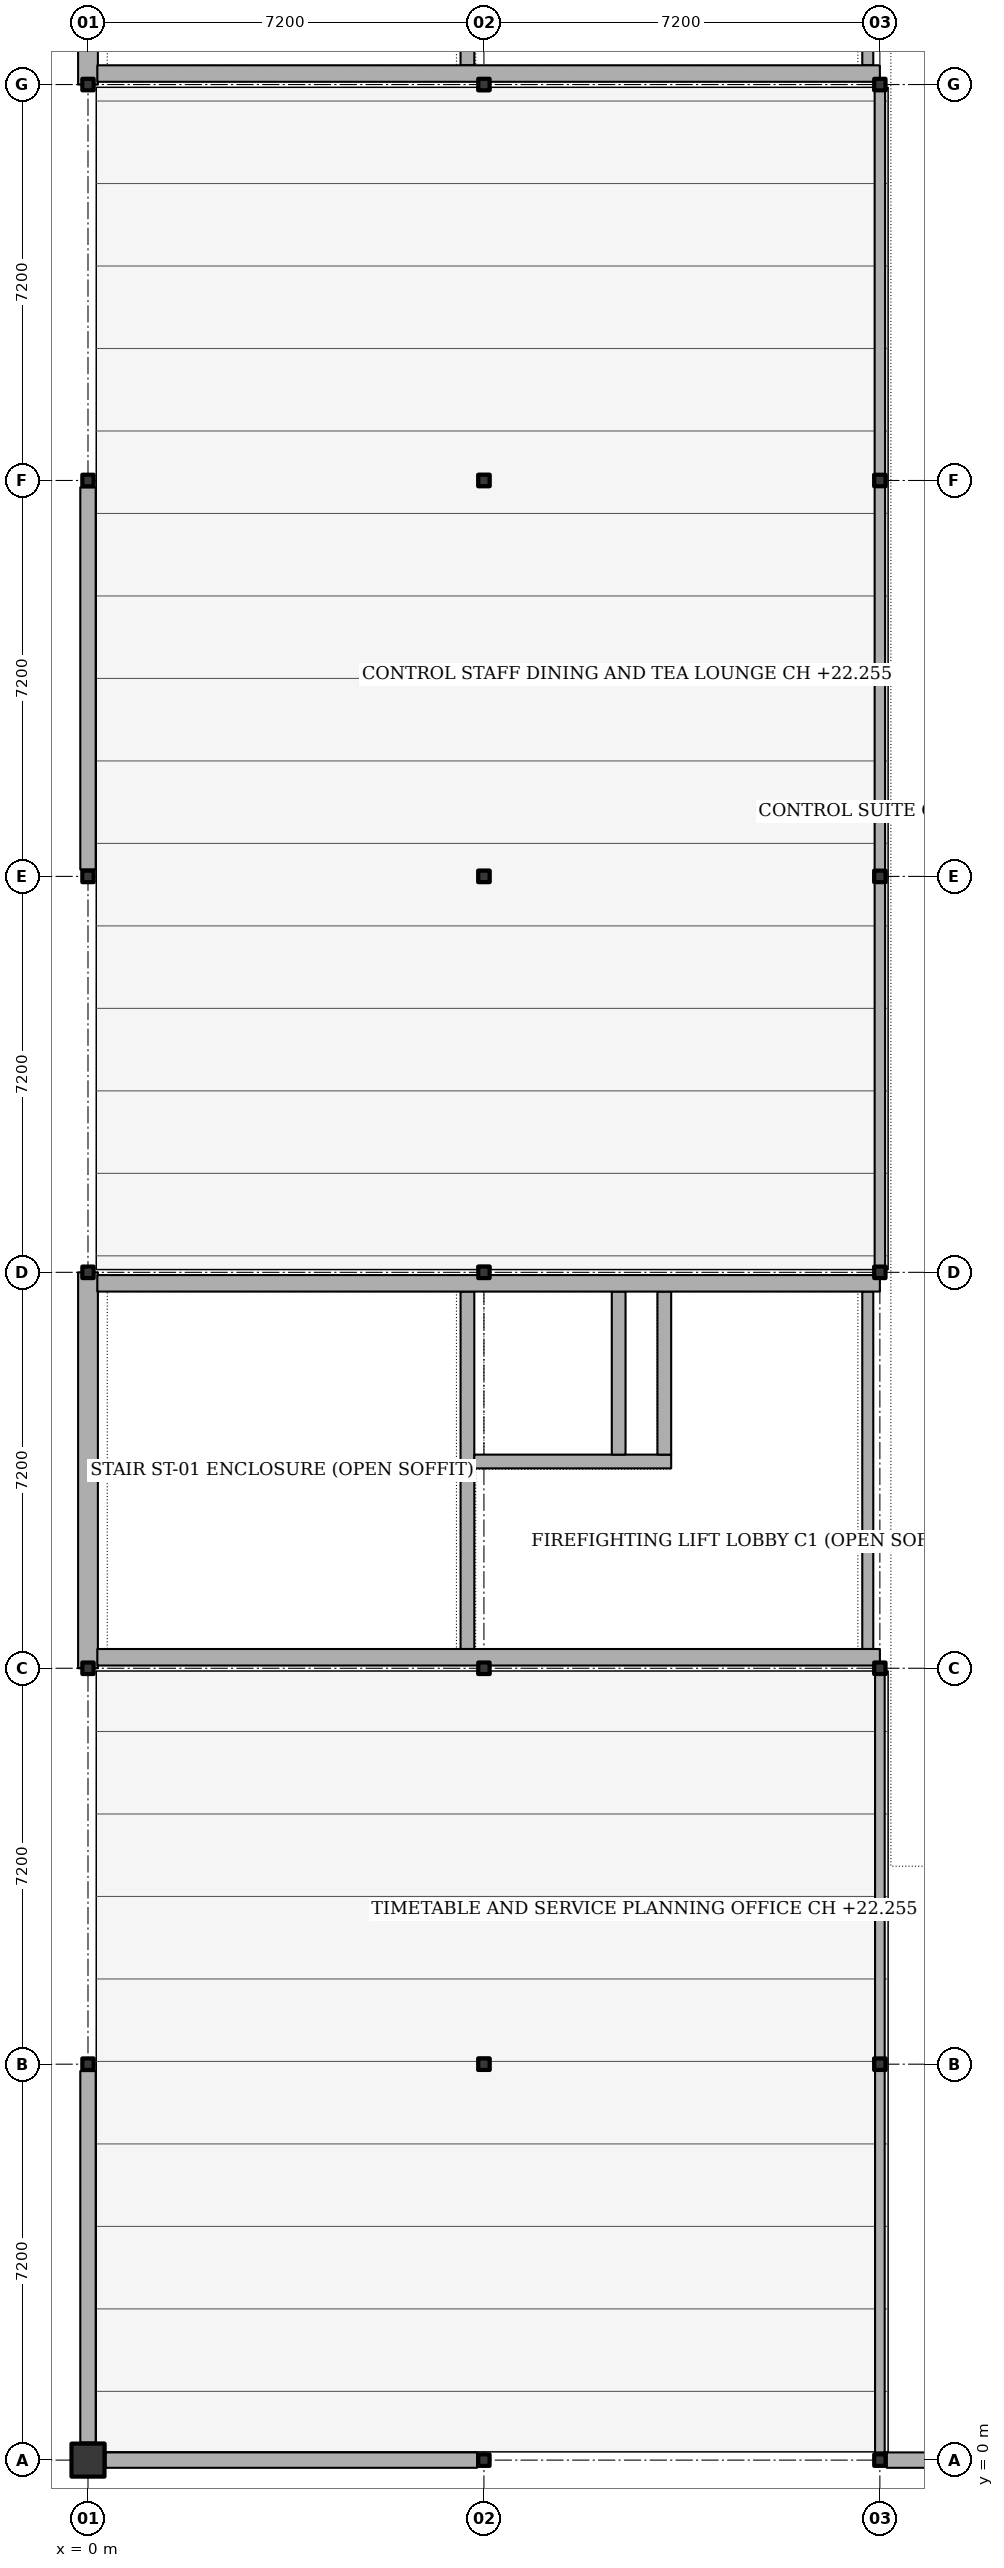
"""IFC4 building model, lengths in metres.
Left out: names, types, materials, properties, quantities, classifications, styles, units other than length and angle.
Written with IfcOpenShell. Run it as: python <this file> out.ifc"""

import sys

from ifc_helpers import new_model, si_unit, direction, frame, frame_2d, origin, origin_with_axes, origin_2d, place, context, subcontext, project, spatial, rectangle, i_section, extrude, element, fill, save


model = new_model("IFC4")
c1 = context("Model", 3, precision=1e-05, world=origin(), true_north=direction((0.0, 1.0)))
c2 = subcontext(c1, "Body", "Model", "MODEL_VIEW")
j1 = project(units=[si_unit("LENGTHUNIT", "METRE"), si_unit("PLANEANGLEUNIT", "RADIAN")], contexts=[c1])
p1 = place(None, origin())
s1 = spatial("IfcSite", under=j1, at=p1, CompositionType="ELEMENT")
p2 = place(p1, origin())
s2 = spatial("IfcBuilding", under=s1, at=p2, CompositionType="ELEMENT")
p3 = place(p2, frame((0.0, 0.0, 18.9)))
s3 = spatial("IfcBuildingStorey", under=s2, at=p3, CompositionType="ELEMENT", Elevation=18.9)
p4 = place(p3, origin_with_axes())
e1 = element("IfcColumn", 1, at=p4, inside=s3, PredefinedType="COLUMN", context=c2, shape_type="SweptSolid", body=[
    extrude(rectangle(XDim=0.6, YDim=0.6, at=origin_2d()), origin(), (0.0, 0.0, 1.0), 4.5),
])
for number, where, z_axis, x_axis in (
    (2, (0.0, 7.2, 0.0), (0.0, 0.0, 1.0), (1.0, 0.0, 0.0)),
    (3, (0.0, 14.4, 0.0), (0.0, 0.0, 1.0), (1.0, 0.0, 0.0)),
    (4, (0.0, 21.6, 0.0), (0.0, 0.0, 1.0), (1.0, 0.0, 0.0)),
    (5, (0.0, 28.8, 0.0), (0.0, 0.0, 1.0), (1.0, 0.0, 0.0)),
    (6, (0.0, 36.0, 0.0), (0.0, 0.0, 1.0), (1.0, 0.0, 0.0)),
    (7, (0.0, 43.2, 0.0), (0.0, 0.0, 1.0), (1.0, 0.0, 0.0)),
    (8, (7.2, 0.0, 0.0), (0.0, 0.0, 1.0), (1.0, 0.0, 0.0)),
    (9, (7.2, 7.2, 0.0), (0.0, 0.0, 1.0), (1.0, 0.0, 0.0)),
    (10, (7.2, 14.4, 0.0), (0.0, 0.0, 1.0), (1.0, 0.0, 0.0)),
    (11, (7.2, 21.6, 0.0), (0.0, 0.0, 1.0), (1.0, 0.0, 0.0)),
    (12, (7.2, 28.8, 0.0), (0.0, 0.0, 1.0), (1.0, 0.0, 0.0)),
    (13, (7.2, 36.0, 0.0), (0.0, 0.0, 1.0), (1.0, 0.0, 0.0)),
    (14, (7.2, 43.2, 0.0), (0.0, 0.0, 1.0), (1.0, 0.0, 0.0)),
    (15, (14.4, 0.0, 0.0), (0.0, 0.0, 1.0), (1.0, 0.0, 0.0)),
    (16, (14.4, 7.2, 0.0), (0.0, 0.0, 1.0), (1.0, 0.0, 0.0)),
    (17, (14.4, 14.4, 0.0), (0.0, 0.0, 1.0), (1.0, 0.0, 0.0)),
    (18, (14.4, 21.6, 0.0), (0.0, 0.0, 1.0), (1.0, 0.0, 0.0)),
    (19, (14.4, 28.8, 0.0), (0.0, 0.0, 1.0), (1.0, 0.0, 0.0)),
    (20, (14.4, 36.0, 0.0), (0.0, 0.0, 1.0), (1.0, 0.0, 0.0)),
    (21, (14.4, 43.2, 0.0), (0.0, 0.0, 1.0), (1.0, 0.0, 0.0)),
):
    element("IfcColumn", number, at=place(p3, frame(where, z_axis=z_axis, x_axis=x_axis)), inside=s3, PredefinedType="COLUMN", context=c2, shape_type="SweptSolid", body=[
        extrude(i_section(OverallWidth=0.206, OverallDepth=0.21, WebThickness=0.01, FlangeThickness=0.014, FilletRadius=0.01, at=origin_2d()), origin(), (0.0, 0.0, 1.0), 4.5),
    ])
p5 = place(p3, frame((0.0, 0.32, 0.0), z_axis=(0.0, 0.0, 1.0), x_axis=(0.0, 1.0, 0.0)))
e22 = element("IfcWall", 22, at=p5, inside=s3, PredefinedType="SOLIDWALL", context=c2, shape_type="SweptSolid", body=[
    extrude(rectangle(XDim=6.755, YDim=0.28, at=frame_2d((3.377, 0.0))), origin(), (0.0, 0.0, 1.0), 3.85),
])
p6 = place(p3, frame((0.0, 14.4, 0.0), z_axis=(0.0, 0.0, 1.0), x_axis=(0.0, 1.0, 0.0)))
e23 = element("IfcWall", 23, at=p6, inside=s3, PredefinedType="SHEAR", context=c2, shape_type="SweptSolid", body=[
    extrude(rectangle(XDim=7.2, YDim=0.36, at=frame_2d((3.6, 0.0))), origin(), (0.0, 0.0, 1.0), 3.85),
])
p7 = place(p3, frame((0.0, 28.925, 0.0), z_axis=(0.0, 0.0, 1.0), x_axis=(0.0, 1.0, 0.0)))
e24 = element("IfcWall", 24, at=p7, inside=s3, PredefinedType="SOLIDWALL", context=c2, shape_type="SweptSolid", body=[
    extrude(rectangle(XDim=6.95, YDim=0.28, at=frame_2d((3.475, 0.0))), origin(), (0.0, 0.0, 1.0), 3.85),
])
p8 = place(p7, frame((2.575, 0.0, 1.05)))
e25 = element("IfcOpeningElement", 25, at=p8, cuts=e24, PredefinedType="OPENING", context=c2, shape_type="SweptSolid", body=[
    extrude(rectangle(XDim=1.8, YDim=1.8, at=frame_2d((0.9, 0.9))), frame((0.0, 0.15, 0.0), z_axis=(0.0, -1.0, 0.0), x_axis=(1.0, 0.0, 0.0)), (0.0, 0.0, 1.0), 0.3),
])
p9 = place(p3, frame((0.0, 43.2, 0.0), z_axis=(0.0, 0.0, 1.0), x_axis=(0.0, 1.0, 0.0)))
e26 = element("IfcWall", 26, at=p9, inside=s3, PredefinedType="SHEAR", context=c2, shape_type="SweptSolid", body=[
    extrude(rectangle(XDim=7.2, YDim=0.36, at=frame_2d((3.6, 0.0))), origin(), (0.0, 0.0, 1.0), 3.85),
])
p10 = place(p3, frame((21.475, 0.0, 0.0), z_axis=(0.0, 0.0, 1.0), x_axis=(-1.0, 0.0, 0.0)))
e27 = element("IfcWall", 27, at=p10, inside=s3, PredefinedType="SOLIDWALL", context=c2, shape_type="SweptSolid", body=[
    extrude(rectangle(XDim=6.95, YDim=0.28, at=frame_2d((3.475, 0.0))), origin(), (0.0, 0.0, 1.0), 3.658),
])
p11 = place(p10, frame((3.803, 0.0, 1.05)))
e28 = element("IfcOpeningElement", 28, at=p11, cuts=e27, PredefinedType="OPENING", context=c2, shape_type="SweptSolid", body=[
    extrude(rectangle(XDim=2.47, YDim=1.5, at=frame_2d((1.235, 0.75))), frame((0.0, 0.15, 0.0), z_axis=(0.0, -1.0, 0.0), x_axis=(1.0, 0.0, 0.0)), (0.0, 0.0, 1.0), 0.3),
])
p12 = place(p3, frame((7.075, 0.0, 0.0), z_axis=(0.0, 0.0, 1.0), x_axis=(-1.0, 0.0, 0.0)))
e29 = element("IfcWall", 29, at=p12, inside=s3, PredefinedType="SOLIDWALL", context=c2, shape_type="SweptSolid", body=[
    extrude(rectangle(XDim=6.755, YDim=0.28, at=frame_2d((3.377, 0.0))), origin(), (0.0, 0.0, 1.0), 3.658),
])
p13 = place(p12, frame((2.478, 0.0, 1.05)))
e30 = element("IfcOpeningElement", 30, at=p13, cuts=e29, PredefinedType="OPENING", context=c2, shape_type="SweptSolid", body=[
    extrude(rectangle(XDim=1.8, YDim=1.8, at=frame_2d((0.9, 0.9))), frame((0.0, 0.15, 0.0), z_axis=(0.0, -1.0, 0.0), x_axis=(1.0, 0.0, 0.0)), (0.0, 0.0, 1.0), 0.3),
])
p14 = place(p3, frame((6.9, 14.75, 0.0), z_axis=(0.0, 0.0, 1.0), x_axis=(0.0, 1.0, 0.0)))
e31 = element("IfcWall", 31, at=p14, inside=s3, PredefinedType="SHEAR", context=c2, shape_type="SweptSolid", body=[
    extrude(rectangle(XDim=6.5, YDim=0.25, at=frame_2d((3.25, 0.0))), origin(), (0.0, 0.0, 1.0), 3.65),
])
p15 = place(p14, frame((0.95, 0.0, 0.0)))
e32 = element("IfcOpeningElement", 32, at=p15, cuts=e31, PredefinedType="OPENING", context=c2, shape_type="SweptSolid", body=[
    extrude(rectangle(XDim=1.35, YDim=2.15, at=frame_2d((0.675, 1.075))), frame((0.0, 0.135, 0.0), z_axis=(0.0, -1.0, 0.0), x_axis=(1.0, 0.0, 0.0)), (0.0, 0.0, 1.0), 0.27),
])
p16 = place(p3, frame((7.025, 18.16, 0.0), z_axis=(0.0, 0.0, 1.0), x_axis=(1.0, 0.0, 0.0)))
e33 = element("IfcWall", 33, at=p16, inside=s3, PredefinedType="SHEAR", context=c2, shape_type="SweptSolid", body=[
    extrude(rectangle(XDim=3.58, YDim=0.25, at=frame_2d((1.79, 0.0))), origin(), (0.0, 0.0, 1.0), 3.65),
])
p17 = place(p16, frame((0.775, 0.0, 0.0)))
e34 = element("IfcOpeningElement", 34, at=p17, cuts=e33, PredefinedType="OPENING", context=c2, shape_type="SweptSolid", body=[
    extrude(rectangle(XDim=1.1, YDim=2.15, at=frame_2d((0.55, 1.075))), frame((0.0, 0.135, 0.0), z_axis=(0.0, -1.0, 0.0), x_axis=(1.0, 0.0, 0.0)), (0.0, 0.0, 1.0), 0.27),
])
p18 = place(p3, frame((9.65, 18.285, 0.0), z_axis=(0.0, 0.0, 1.0), x_axis=(0.0, 1.0, 0.0)))
e35 = element("IfcWall", 35, at=p18, inside=s3, PredefinedType="SHEAR", context=c2, shape_type="SweptSolid", body=[
    extrude(rectangle(XDim=2.965, YDim=0.25, at=frame_2d((1.482, 0.0))), origin(), (0.0, 0.0, 1.0), 3.65),
])
p19 = place(p3, frame((10.48, 18.285, 0.0), z_axis=(0.0, 0.0, 1.0), x_axis=(0.0, 1.0, 0.0)))
e36 = element("IfcWall", 36, at=p19, inside=s3, PredefinedType="SHEAR", context=c2, shape_type="SweptSolid", body=[
    extrude(rectangle(XDim=2.965, YDim=0.25, at=frame_2d((1.482, 0.0))), origin(), (0.0, 0.0, 1.0), 3.65),
])
p20 = place(p19, frame((0.9, 0.0, 0.0)))
e37 = element("IfcOpeningElement", 37, at=p20, cuts=e36, PredefinedType="OPENING", context=c2, shape_type="SweptSolid", body=[
    extrude(rectangle(XDim=0.92, YDim=2.05, at=frame_2d((0.46, 1.025))), frame((0.0, 0.135, 0.0), z_axis=(0.0, -1.0, 0.0), x_axis=(1.0, 0.0, 0.0)), (0.0, 0.0, 1.0), 0.27),
])
p21 = place(p3, frame((14.18, 14.75, 0.0), z_axis=(0.0, 0.0, 1.0), x_axis=(0.0, 1.0, 0.0)))
e38 = element("IfcWall", 38, at=p21, inside=s3, PredefinedType="SOLIDWALL", context=c2, shape_type="SweptSolid", body=[
    extrude(rectangle(XDim=6.5, YDim=0.2, at=frame_2d((3.25, 0.0))), origin(), (0.0, 0.0, 1.0), 3.65),
])
p22 = place(p21, frame((2.5, 0.0, 0.0)))
e39 = element("IfcOpeningElement", 39, at=p22, cuts=e38, PredefinedType="OPENING", context=c2, shape_type="SweptSolid", body=[
    extrude(rectangle(XDim=1.5, YDim=2.15, at=frame_2d((0.75, 1.075))), frame((0.0, 0.11, 0.0), z_axis=(0.0, -1.0, 0.0), x_axis=(1.0, 0.0, 0.0)), (0.0, 0.0, 1.0), 0.22),
])
for number, where, z_axis, x_axis in (
    (40, (0.17, 14.6, 0.0), (0.0, 0.0, 1.0), (1.0, 0.0, 0.0)),
    (41, (0.17, 21.4, 0.0), (0.0, 0.0, 1.0), (1.0, 0.0, 0.0)),
):
    element("IfcWall", number, at=place(p3, frame(where, z_axis=z_axis, x_axis=x_axis)), inside=s3, PredefinedType="SHEAR", context=c2, shape_type="SweptSolid", body=[
        extrude(rectangle(XDim=14.23, YDim=0.3, at=frame_2d((7.115, 0.0))), origin(), (0.0, 0.0, 1.0), 3.65),
    ])
p23 = place(p3, frame((6.9, 43.55, 0.0), z_axis=(0.0, 0.0, 1.0), x_axis=(0.0, 1.0, 0.0)))
e42 = element("IfcWall", 42, at=p23, inside=s3, PredefinedType="SHEAR", context=c2, shape_type="SweptSolid", body=[
    extrude(rectangle(XDim=6.5, YDim=0.25, at=frame_2d((3.25, 0.0))), origin(), (0.0, 0.0, 1.0), 3.65),
])
p24 = place(p23, frame((0.95, 0.0, 0.0)))
e43 = element("IfcOpeningElement", 43, at=p24, cuts=e42, PredefinedType="OPENING", context=c2, shape_type="SweptSolid", body=[
    extrude(rectangle(XDim=1.35, YDim=2.15, at=frame_2d((0.675, 1.075))), frame((0.0, 0.135, 0.0), z_axis=(0.0, -1.0, 0.0), x_axis=(1.0, 0.0, 0.0)), (0.0, 0.0, 1.0), 0.27),
])
p25 = place(p3, frame((14.18, 43.55, 0.0), z_axis=(0.0, 0.0, 1.0), x_axis=(0.0, 1.0, 0.0)))
e44 = element("IfcWall", 44, at=p25, inside=s3, PredefinedType="SOLIDWALL", context=c2, shape_type="SweptSolid", body=[
    extrude(rectangle(XDim=6.5, YDim=0.2, at=frame_2d((3.25, 0.0))), origin(), (0.0, 0.0, 1.0), 3.65),
])
p26 = place(p25, frame((2.5, 0.0, 0.0)))
e45 = element("IfcOpeningElement", 45, at=p26, cuts=e44, PredefinedType="OPENING", context=c2, shape_type="SweptSolid", body=[
    extrude(rectangle(XDim=1.5, YDim=2.15, at=frame_2d((0.75, 1.075))), frame((0.0, 0.11, 0.0), z_axis=(0.0, -1.0, 0.0), x_axis=(1.0, 0.0, 0.0)), (0.0, 0.0, 1.0), 0.22),
])
p27 = place(p3, frame((0.17, 43.4, 0.0), z_axis=(0.0, 0.0, 1.0), x_axis=(1.0, 0.0, 0.0)))
e46 = element("IfcWall", 46, at=p27, inside=s3, PredefinedType="SHEAR", context=c2, shape_type="SweptSolid", body=[
    extrude(rectangle(XDim=14.23, YDim=0.3, at=frame_2d((7.115, 0.0))), origin(), (0.0, 0.0, 1.0), 3.65),
])
p28 = place(p3, frame((14.4, 0.14, 0.0), z_axis=(0.0, 0.0, 1.0), x_axis=(0.0, 1.0, 0.0)))
e47 = element("IfcWall", 47, at=p28, inside=s3, PredefinedType="PARTITIONING", context=c2, shape_type="SweptSolid", body=[
    extrude(rectangle(XDim=6.953, YDim=0.175, at=frame_2d((3.477, 0.0))), origin(), (0.0, 0.0, 1.0), 3.55),
])
p29 = place(p3, frame((14.4, 7.307, 0.0), z_axis=(0.0, 0.0, 1.0), x_axis=(0.0, 1.0, 0.0)))
e48 = element("IfcWall", 48, at=p29, inside=s3, PredefinedType="PARTITIONING", context=c2, shape_type="SweptSolid", body=[
    extrude(rectangle(XDim=6.986, YDim=0.175, at=frame_2d((3.493, 0.0))), origin(), (0.0, 0.0, 1.0), 3.55),
])
p30 = place(p29, frame((3.613, 0.0, 0.0)))
e49 = element("IfcOpeningElement", 49, at=p30, cuts=e48, PredefinedType="OPENING", context=c2, shape_type="SweptSolid", body=[
    extrude(rectangle(XDim=1.18, YDim=2.18, at=frame_2d((0.59, 1.09))), frame((0.0, 0.097, 0.0), z_axis=(0.0, -1.0, 0.0), x_axis=(1.0, 0.0, 0.0)), (0.0, 0.0, 1.0), 0.195),
])
p31 = place(p3, frame((14.4, 21.707, 0.0), z_axis=(0.0, 0.0, 1.0), x_axis=(0.0, 1.0, 0.0)))
e50 = element("IfcWall", 50, at=p31, inside=s3, PredefinedType="PARTITIONING", context=c2, shape_type="SweptSolid", body=[
    extrude(rectangle(XDim=6.986, YDim=0.19, at=frame_2d((3.493, 0.0))), origin(), (0.0, 0.0, 1.0), 3.55),
])
p32 = place(p3, frame((14.4, 28.907, 0.0), z_axis=(0.0, 0.0, 1.0), x_axis=(0.0, 1.0, 0.0)))
e51 = element("IfcWall", 51, at=p32, inside=s3, PredefinedType="PARTITIONING", context=c2, shape_type="SweptSolid", body=[
    extrude(rectangle(XDim=6.986, YDim=0.19, at=frame_2d((3.493, 0.0))), origin(), (0.0, 0.0, 1.0), 3.55),
])
p33 = place(p32, frame((2.693, 0.0, 0.0)))
e52 = element("IfcOpeningElement", 52, at=p33, cuts=e51, PredefinedType="OPENING", context=c2, shape_type="SweptSolid", body=[
    extrude(rectangle(XDim=1.6, YDim=2.2, at=frame_2d((0.8, 1.1))), frame((0.0, 0.105, 0.0), z_axis=(0.0, -1.0, 0.0), x_axis=(1.0, 0.0, 0.0)), (0.0, 0.0, 1.0), 0.21),
])
p34 = place(p3, frame((14.4, 36.107, 0.0), z_axis=(0.0, 0.0, 1.0), x_axis=(0.0, 1.0, 0.0)))
e53 = element("IfcWall", 53, at=p34, inside=s3, PredefinedType="PARTITIONING", context=c2, shape_type="SweptSolid", body=[
    extrude(rectangle(XDim=6.986, YDim=0.19, at=frame_2d((3.493, 0.0))), origin(), (0.0, 0.0, 1.0), 3.55),
])
p35 = place(p8, origin())
e54 = element("IfcWindow", 54, at=p35, inside=s3, PartitioningType="SINGLE_PANEL", PredefinedType="WINDOW", context=c2, shape_type="SweptSolid", body=[
    extrude(rectangle(XDim=1.8, YDim=1.8, at=frame_2d((0.9, 0.9))), frame((0.0, 0.03, 0.0), z_axis=(0.0, -1.0, 0.0), x_axis=(1.0, 0.0, 0.0)), (0.0, 0.0, 1.0), 0.06),
])
fill(e25, e54)
p36 = place(p13, origin())
e55 = element("IfcWindow", 55, at=p36, inside=s3, PartitioningType="SINGLE_PANEL", PredefinedType="WINDOW", context=c2, shape_type="SweptSolid", body=[
    extrude(rectangle(XDim=1.8, YDim=1.8, at=frame_2d((0.9, 0.9))), frame((0.0, 0.03, 0.0), z_axis=(0.0, -1.0, 0.0), x_axis=(1.0, 0.0, 0.0)), (0.0, 0.0, 1.0), 0.06),
])
fill(e30, e55)
p37 = place(p15, origin())
e56 = element("IfcDoor", 56, at=p37, inside=s3, OperationType="SINGLE_SWING_RIGHT", PredefinedType="DOOR", context=c2, shape_type="SweptSolid", body=[
    extrude(rectangle(XDim=1.35, YDim=2.15, at=frame_2d((0.675, 1.075))), frame((0.0, 0.025, 0.0), z_axis=(0.0, -1.0, 0.0), x_axis=(1.0, 0.0, 0.0)), (0.0, 0.0, 1.0), 0.05),
])
fill(e32, e56)
p38 = place(p17, origin())
e57 = element("IfcDoor", 57, at=p38, inside=s3, OperationType="SLIDING_TO_LEFT", PredefinedType="DOOR", context=c2, shape_type="SweptSolid", body=[
    extrude(rectangle(XDim=1.1, YDim=2.15, at=frame_2d((0.55, 1.075))), frame((0.0, 0.025, 0.0), z_axis=(0.0, -1.0, 0.0), x_axis=(1.0, 0.0, 0.0)), (0.0, 0.0, 1.0), 0.05),
])
fill(e34, e57)
p39 = place(p20, origin())
e58 = element("IfcDoor", 58, at=p39, inside=s3, OperationType="SINGLE_SWING_LEFT", PredefinedType="DOOR", context=c2, shape_type="SweptSolid", body=[
    extrude(rectangle(XDim=0.92, YDim=2.05, at=frame_2d((0.46, 1.025))), frame((0.0, 0.025, 0.0), z_axis=(0.0, -1.0, 0.0), x_axis=(1.0, 0.0, 0.0)), (0.0, 0.0, 1.0), 0.05),
])
fill(e37, e58)
p40 = place(p22, origin())
e59 = element("IfcDoor", 59, at=p40, inside=s3, OperationType="SINGLE_SWING_RIGHT", PredefinedType="DOOR", context=c2, shape_type="SweptSolid", body=[
    extrude(rectangle(XDim=1.5, YDim=2.15, at=frame_2d((0.75, 1.075))), frame((0.0, 0.025, 0.0), z_axis=(0.0, -1.0, 0.0), x_axis=(1.0, 0.0, 0.0)), (0.0, 0.0, 1.0), 0.05),
])
fill(e39, e59)
p41 = place(p30, origin())
e60 = element("IfcDoor", 60, at=p41, inside=s3, OperationType="SINGLE_SWING_LEFT", PredefinedType="DOOR", context=c2, shape_type="SweptSolid", body=[
    extrude(rectangle(XDim=1.18, YDim=2.18, at=frame_2d((0.59, 1.09))), frame((0.0, 0.025, 0.0), z_axis=(0.0, -1.0, 0.0), x_axis=(1.0, 0.0, 0.0)), (0.0, 0.0, 1.0), 0.05),
])
fill(e49, e60)
p42 = place(p33, origin())
e61 = element("IfcDoor", 61, at=p42, inside=s3, OperationType="DOUBLE_SWING_LEFT", PredefinedType="DOOR", context=c2, shape_type="SweptSolid", body=[
    extrude(rectangle(XDim=1.6, YDim=2.2, at=frame_2d((0.8, 1.1))), frame((0.0, 0.025, 0.0), z_axis=(0.0, -1.0, 0.0), x_axis=(1.0, 0.0, 0.0)), (0.0, 0.0, 1.0), 0.05),
])
fill(e52, e61)
save(model, sys.argv[1])
